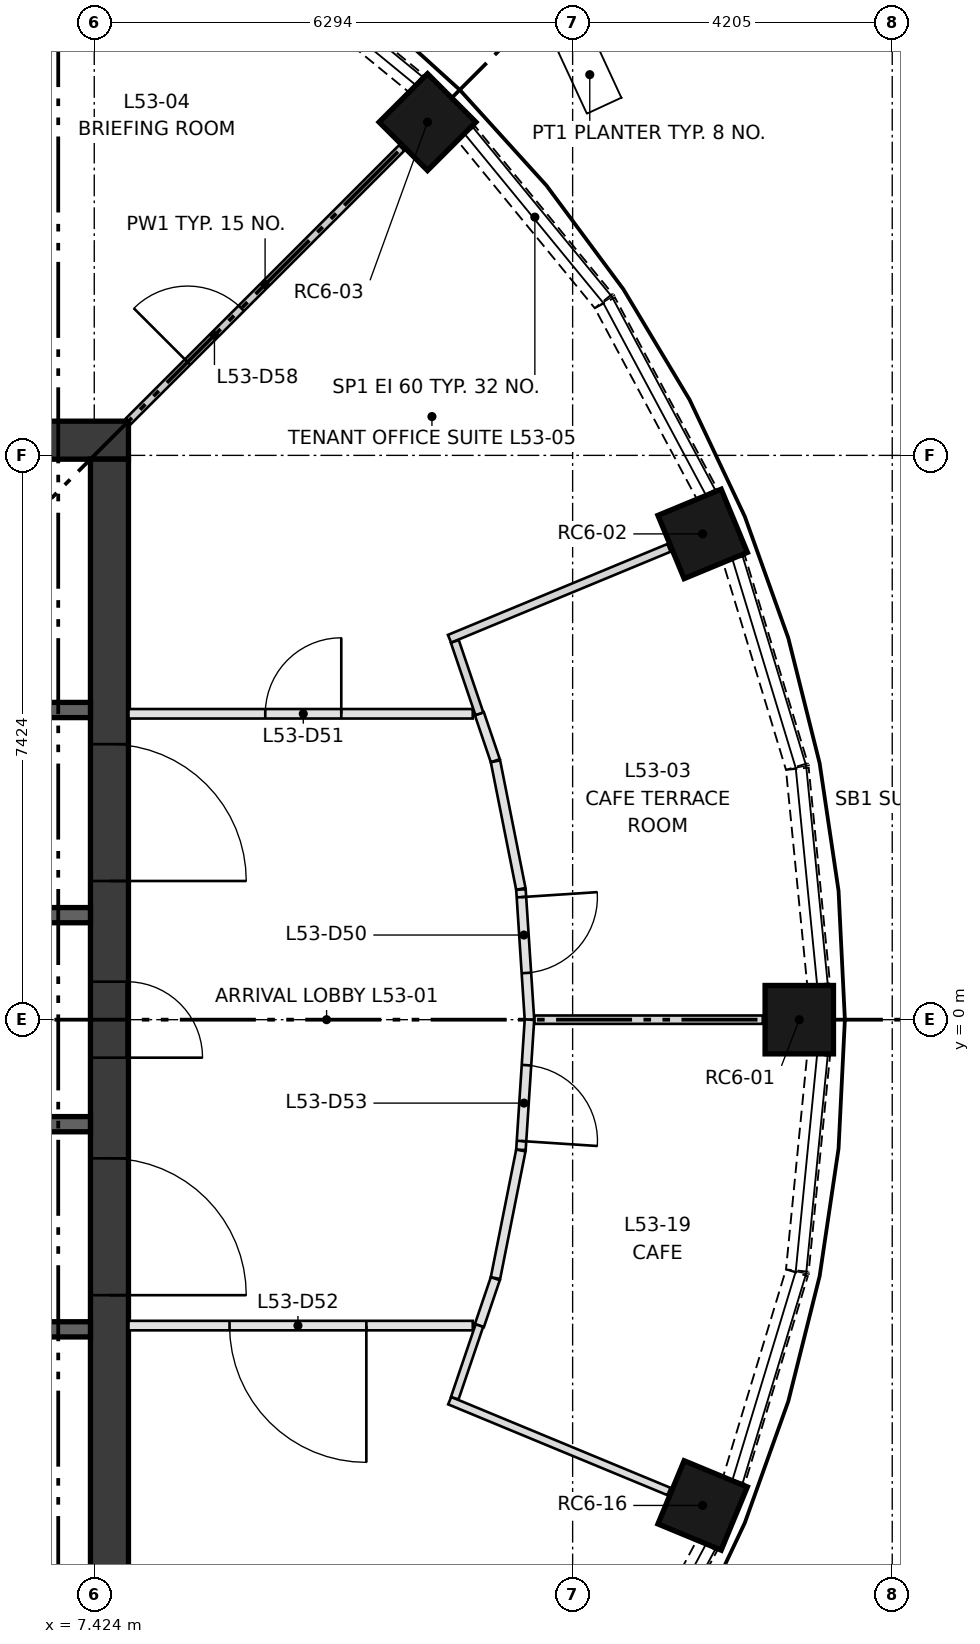
"""IFC4 building model, lengths in metres.
Left out: names, types, materials, properties, quantities, classifications, styles, units other than length and angle.
Written with IfcOpenShell. Run it as: python <this file> out.ifc"""

import sys

from ifc_helpers import new_model, si_unit, direction, frame, frame_2d, origin, origin_2d, place, context, subcontext, project, spatial, rectangle, extrude, element, fill, save


model = new_model("IFC4")
c1 = context("Model", 3, precision=1e-05, world=origin(), true_north=direction((0.0, 1.0)))
c2 = subcontext(c1, "Body", "Model", "MODEL_VIEW")
j1 = project(units=[si_unit("LENGTHUNIT", "METRE"), si_unit("PLANEANGLEUNIT", "RADIAN")], contexts=[c1])
p1 = place(None, origin())
s1 = spatial("IfcSite", under=j1, at=p1, CompositionType="ELEMENT")
p2 = place(p1, origin())
s2 = spatial("IfcBuilding", under=s1, at=p2, CompositionType="ELEMENT")
p3 = place(p2, frame((0.0, 0.0, 197.7)))
s3 = spatial("IfcBuildingStorey", under=s2, at=p3, CompositionType="ELEMENT", Elevation=197.7)
for number, where, z_axis, x_axis in (
    (1, (16.7, 0.0, 0.5), (0.0, 0.0, 1.0), (1.0, 0.0, 0.0)),
    (2, (15.429, 6.391, 0.5), (0.0, 0.0, 1.0), (0.924, 0.383, 0.0)),
    (3, (11.809, 11.809, 0.5), (0.0, 0.0, 1.0), (0.707, 0.707, 0.0)),
    (4, (15.429, -6.391, 0.5), (0.0, 0.0, 1.0), (0.924, -0.383, 0.0)),
):
    element("IfcColumn", number, at=place(p3, frame(where, z_axis=z_axis, x_axis=x_axis)), inside=s3, PredefinedType="COLUMN", context=c2, shape_type="SweptSolid", body=[
        extrude(rectangle(XDim=0.9, YDim=0.9, at=origin_2d()), origin(), (0.0, 0.0, 1.0), 2.85),
    ])
p4 = place(p3, frame((-7.874, 7.624, 0.0), z_axis=(0.0, 0.0, 1.0), x_axis=(1.0, 0.0, 0.0)))
e5 = element("IfcWall", 5, at=p4, inside=s3, PredefinedType="SHEAR", context=c2, shape_type="SweptSolid", body=[
    extrude(rectangle(XDim=15.748, YDim=0.5, at=frame_2d((7.874, 0.0))), origin(), (0.0, 0.0, 1.0), 3.35),
])
p5 = place(p3, frame((7.624, -7.374, 0.0), z_axis=(0.0, 0.0, 1.0), x_axis=(0.0, 1.0, 0.0)))
e6 = element("IfcWall", 6, at=p5, inside=s3, PredefinedType="SHEAR", context=c2, shape_type="SweptSolid", body=[
    extrude(rectangle(XDim=14.748, YDim=0.5, at=frame_2d((7.374, 0.0))), origin(), (0.0, 0.0, 1.0), 3.35),
])
p6 = place(p5, frame((6.874, 0.0, 0.0)))
e7 = element("IfcOpeningElement", 7, at=p6, cuts=e6, PredefinedType="OPENING", context=c2, shape_type="SweptSolid", body=[
    extrude(rectangle(XDim=1.0, YDim=2.1, at=frame_2d((0.5, 1.05))), frame((0.0, 0.26, 0.0), z_axis=(0.0, -1.0, 0.0), x_axis=(1.0, 0.0, 0.0)), (0.0, 0.0, 1.0), 0.52),
])
p7 = place(p5, frame((3.75, 0.0, 0.0)))
e8 = element("IfcOpeningElement", 8, at=p7, cuts=e6, PredefinedType="OPENING", context=c2, shape_type="SweptSolid", body=[
    extrude(rectangle(XDim=1.8, YDim=2.1, at=frame_2d((0.9, 1.05))), frame((0.0, 0.26, 0.0), z_axis=(0.0, -1.0, 0.0), x_axis=(1.0, 0.0, 0.0)), (0.0, 0.0, 1.0), 0.52),
])
p8 = place(p5, frame((9.198, 0.0, 0.0)))
e9 = element("IfcOpeningElement", 9, at=p8, cuts=e6, PredefinedType="OPENING", context=c2, shape_type="SweptSolid", body=[
    extrude(rectangle(XDim=1.8, YDim=2.1, at=frame_2d((0.9, 1.05))), frame((0.0, 0.26, 0.0), z_axis=(0.0, -1.0, 0.0), x_axis=(1.0, 0.0, 0.0)), (0.0, 0.0, 1.0), 0.52),
])
p9 = place(p3, frame((-7.374, -4.074, 0.0), z_axis=(0.0, 0.0, 1.0), x_axis=(1.0, 0.0, 0.0)))
e10 = element("IfcWall", 10, at=p9, inside=s3, PredefinedType="SHEAR", context=c2, shape_type="SweptSolid", body=[
    extrude(rectangle(XDim=14.748, YDim=0.2, at=frame_2d((7.374, 0.0))), origin(), (0.0, 0.0, 1.0), 3.0),
])
p10 = place(p9, frame((1.319, 0.0, 0.0)))
e11 = element("IfcOpeningElement", 11, at=p10, cuts=e10, PredefinedType="OPENING", context=c2, shape_type="SweptSolid", body=[
    extrude(rectangle(XDim=1.1, YDim=2.1, at=frame_2d((0.55, 1.05))), frame((0.0, 0.11, 0.0), z_axis=(0.0, -1.0, 0.0), x_axis=(1.0, 0.0, 0.0)), (0.0, 0.0, 1.0), 0.22),
])
p11 = place(p9, frame((4.456, 0.0, 0.0)))
e12 = element("IfcOpeningElement", 12, at=p11, cuts=e10, PredefinedType="OPENING", context=c2, shape_type="SweptSolid", body=[
    extrude(rectangle(XDim=1.1, YDim=2.1, at=frame_2d((0.55, 1.05))), frame((0.0, 0.11, 0.0), z_axis=(0.0, -1.0, 0.0), x_axis=(1.0, 0.0, 0.0)), (0.0, 0.0, 1.0), 0.22),
])
p12 = place(p9, frame((7.918, 0.0, 0.0)))
e13 = element("IfcOpeningElement", 13, at=p12, cuts=e10, PredefinedType="OPENING", context=c2, shape_type="SweptSolid", body=[
    extrude(rectangle(XDim=1.0, YDim=2.1, at=frame_2d((0.5, 1.05))), frame((0.0, 0.11, 0.0), z_axis=(0.0, -1.0, 0.0), x_axis=(1.0, 0.0, 0.0)), (0.0, 0.0, 1.0), 0.22),
])
p13 = place(p9, frame((10.51, 0.0, 0.0)))
e14 = element("IfcOpeningElement", 14, at=p13, cuts=e10, PredefinedType="OPENING", context=c2, shape_type="SweptSolid", body=[
    extrude(rectangle(XDim=1.0, YDim=2.1, at=frame_2d((0.5, 1.05))), frame((0.0, 0.11, 0.0), z_axis=(0.0, -1.0, 0.0), x_axis=(1.0, 0.0, 0.0)), (0.0, 0.0, 1.0), 0.22),
])
p14 = place(p9, frame((12.903, 0.0, 0.0)))
e15 = element("IfcOpeningElement", 15, at=p14, cuts=e10, PredefinedType="OPENING", context=c2, shape_type="SweptSolid", body=[
    extrude(rectangle(XDim=0.8, YDim=2.1, at=frame_2d((0.4, 1.05))), frame((0.0, 0.11, 0.0), z_axis=(0.0, -1.0, 0.0), x_axis=(1.0, 0.0, 0.0)), (0.0, 0.0, 1.0), 0.22),
])
p15 = place(p3, frame((0.0, 4.074, 0.0), z_axis=(0.0, 0.0, 1.0), x_axis=(1.0, 0.0, 0.0)))
e16 = element("IfcWall", 16, at=p15, inside=s3, PredefinedType="SHEAR", context=c2, shape_type="SweptSolid", body=[
    extrude(rectangle(XDim=7.374, YDim=0.2, at=frame_2d((3.687, 0.0))), origin(), (0.0, 0.0, 1.0), 3.0),
])
p16 = place(p15, frame((0.384, 0.0, 0.0)))
e17 = element("IfcOpeningElement", 17, at=p16, cuts=e16, PredefinedType="OPENING", context=c2, shape_type="SweptSolid", body=[
    extrude(rectangle(XDim=1.0, YDim=2.1, at=frame_2d((0.5, 1.05))), frame((0.0, 0.11, 0.0), z_axis=(0.0, -1.0, 0.0), x_axis=(1.0, 0.0, 0.0)), (0.0, 0.0, 1.0), 0.22),
])
p17 = place(p15, frame((2.153, 0.0, 0.0)))
e18 = element("IfcOpeningElement", 18, at=p17, cuts=e16, PredefinedType="OPENING", context=c2, shape_type="SweptSolid", body=[
    extrude(rectangle(XDim=1.0, YDim=2.1, at=frame_2d((0.5, 1.05))), frame((0.0, 0.11, 0.0), z_axis=(0.0, -1.0, 0.0), x_axis=(1.0, 0.0, 0.0)), (0.0, 0.0, 1.0), 0.22),
])
p18 = place(p15, frame((3.921, 0.0, 0.0)))
e19 = element("IfcOpeningElement", 19, at=p18, cuts=e16, PredefinedType="OPENING", context=c2, shape_type="SweptSolid", body=[
    extrude(rectangle(XDim=1.0, YDim=2.1, at=frame_2d((0.5, 1.05))), frame((0.0, 0.11, 0.0), z_axis=(0.0, -1.0, 0.0), x_axis=(1.0, 0.0, 0.0)), (0.0, 0.0, 1.0), 0.22),
])
p19 = place(p15, frame((5.79, 0.0, 0.0)))
e20 = element("IfcOpeningElement", 20, at=p19, cuts=e16, PredefinedType="OPENING", context=c2, shape_type="SweptSolid", body=[
    extrude(rectangle(XDim=0.8, YDim=2.1, at=frame_2d((0.4, 1.05))), frame((0.0, 0.11, 0.0), z_axis=(0.0, -1.0, 0.0), x_axis=(1.0, 0.0, 0.0)), (0.0, 0.0, 1.0), 0.22),
])
for number, where, z_axis, x_axis in (
    (21, (4.374, -1.375, 0.0), (0.0, 0.0, 1.0), (1.0, 0.0, 0.0)),
    (22, (4.374, 1.375, 0.0), (0.0, 0.0, 1.0), (1.0, 0.0, 0.0)),
):
    element("IfcWall", number, at=place(p3, frame(where, z_axis=z_axis, x_axis=x_axis)), inside=s3, PredefinedType="SHEAR", context=c2, shape_type="SweptSolid", body=[
        extrude(rectangle(XDim=3.0, YDim=0.2, at=frame_2d((1.5, 0.0))), origin(), (0.0, 0.0, 1.0), 3.0),
    ])
p20 = place(p3, frame((16.955, 0.464, 0.0), z_axis=(0.0, 0.0, 1.0), x_axis=(-0.098223350935, 0.995164395128, 0.0)))
e23 = element("IfcWall", 23, at=p20, inside=s3, PredefinedType="SOLIDWALL", context=c2, shape_type="SweptSolid", body=[
    extrude(rectangle(XDim=2.851, YDim=0.3, at=frame_2d((1.425, 0.0))), origin(), (0.0, 0.0, 1.0), 0.9),
])
p21 = place(p3, frame((16.669, 3.33, 0.0), z_axis=(0.0, 0.0, 1.0), x_axis=(-0.290432618929, 0.956895445627, 0.0)))
e24 = element("IfcWall", 24, at=p21, inside=s3, PredefinedType="SOLIDWALL", context=c2, shape_type="SweptSolid", body=[
    extrude(rectangle(XDim=2.852, YDim=0.3, at=frame_2d((1.426, 0.0))), origin(), (0.0, 0.0, 1.0), 0.9),
])
p22 = place(p3, frame((15.486, 6.917, 0.0), z_axis=(0.0, 0.0, 1.0), x_axis=(-0.471441594872, 0.881897285756, 0.0)))
e25 = element("IfcWall", 25, at=p22, inside=s3, PredefinedType="SOLIDWALL", context=c2, shape_type="SweptSolid", body=[
    extrude(rectangle(XDim=2.85, YDim=0.3, at=frame_2d((1.425, 0.0))), origin(), (0.0, 0.0, 1.0), 0.9),
])
for number, where, z_axis, x_axis in (
    (26, (14.125, 9.456, 0.0), (0.0, 0.0, 1.0), (-0.634, 0.773, 0.0)),
    (27, (11.661, 12.316, 0.0), (0.0, 0.0, 1.0), (-0.773, 0.634, 0.0)),
):
    element("IfcWall", number, at=place(p3, frame(where, z_axis=z_axis, x_axis=x_axis)), inside=s3, PredefinedType="SOLIDWALL", context=c2, shape_type="SweptSolid", body=[
        extrude(rectangle(XDim=2.853, YDim=0.3, at=frame_2d((1.426, 0.0))), origin(), (0.0, 0.0, 1.0), 0.9),
    ])
p23 = place(p3, frame((14.142, -9.431, 0.0), z_axis=(0.0, 0.0, 1.0), x_axis=(0.471441594872, 0.881897285756, 0.0)))
e28 = element("IfcWall", 28, at=p23, inside=s3, PredefinedType="SOLIDWALL", context=c2, shape_type="SweptSolid", body=[
    extrude(rectangle(XDim=2.85, YDim=0.3, at=frame_2d((1.425, 0.0))), origin(), (0.0, 0.0, 1.0), 0.9),
])
p24 = place(p3, frame((15.84, -6.06, 0.0), z_axis=(0.0, 0.0, 1.0), x_axis=(0.290432618929, 0.956895445627, 0.0)))
e29 = element("IfcWall", 29, at=p24, inside=s3, PredefinedType="SOLIDWALL", context=c2, shape_type="SweptSolid", body=[
    extrude(rectangle(XDim=2.852, YDim=0.3, at=frame_2d((1.426, 0.0))), origin(), (0.0, 0.0, 1.0), 0.9),
])
p25 = place(p3, frame((16.675, -3.301, 0.0), z_axis=(0.0, 0.0, 1.0), x_axis=(0.098223350935, 0.995164395128, 0.0)))
e30 = element("IfcWall", 30, at=p25, inside=s3, PredefinedType="SOLIDWALL", context=c2, shape_type="SweptSolid", body=[
    extrude(rectangle(XDim=2.851, YDim=0.3, at=frame_2d((1.425, 0.0))), origin(), (0.0, 0.0, 1.0), 0.9),
])
p26 = place(p3, frame((12.491, 4.024, 0.0), z_axis=(0.0, 0.0, 1.0), x_axis=(0.321506357846, -0.946907419902, 0.0)))
e31 = element("IfcWall", 31, at=p26, inside=s3, PredefinedType="PARTITIONING", context=c2, shape_type="SweptSolid", body=[
    extrude(rectangle(XDim=0.652, YDim=0.125, at=frame_2d((0.326, 0.0))), origin(), (0.0, 0.0, 1.0), 3.0),
])
p27 = place(p3, frame((12.703, 3.399, 0.0), z_axis=(0.0, 0.0, 1.0), x_axis=(0.195101249107, -0.980783106806, 0.0)))
e32 = element("IfcWall", 32, at=p27, inside=s3, PredefinedType="PARTITIONING", context=c2, shape_type="SweptSolid", body=[
    extrude(rectangle(XDim=1.712, YDim=0.125, at=frame_2d((0.856, 0.0))), origin(), (0.0, 0.0, 1.0), 3.0),
])
p28 = place(p3, frame((13.038, 1.712, 0.0), z_axis=(0.0, 0.0, 1.0), x_axis=(0.065300872496, -0.997865620237, 0.0)))
e33 = element("IfcWall", 33, at=p28, inside=s3, PredefinedType="PARTITIONING", context=c2, shape_type="SweptSolid", body=[
    extrude(rectangle(XDim=1.716, YDim=0.125, at=frame_2d((0.858, 0.0))), origin(), (0.0, 0.0, 1.0), 3.0),
])
p29 = place(p28, frame((0.1, 0.0, 0.0)))
e34 = element("IfcOpeningElement", 34, at=p29, cuts=e33, PredefinedType="OPENING", context=c2, shape_type="SweptSolid", body=[
    extrude(rectangle(XDim=1.0, YDim=2.1, at=frame_2d((0.5, 1.05))), frame((0.0, 0.073, 0.0), z_axis=(0.0, -1.0, 0.0), x_axis=(1.0, 0.0, 0.0)), (0.0, 0.0, 1.0), 0.145),
])
p30 = place(p3, frame((7.874, 4.024, 0.0), z_axis=(0.0, 0.0, 1.0), x_axis=(1.0, 0.0, 0.0)))
e35 = element("IfcWall", 35, at=p30, inside=s3, PredefinedType="PARTITIONING", context=c2, shape_type="SweptSolid", body=[
    extrude(rectangle(XDim=4.53, YDim=0.125, at=frame_2d((2.265, 0.0))), origin(), (0.0, 0.0, 1.0), 3.0),
])
p31 = place(p30, frame((1.8, 0.0, 0.0)))
e36 = element("IfcOpeningElement", 36, at=p31, cuts=e35, PredefinedType="OPENING", context=c2, shape_type="SweptSolid", body=[
    extrude(rectangle(XDim=1.0, YDim=2.1, at=frame_2d((0.5, 1.05))), frame((0.0, 0.073, 0.0), z_axis=(0.0, -1.0, 0.0), x_axis=(1.0, 0.0, 0.0)), (0.0, 0.0, 1.0), 0.145),
])
p32 = place(p3, frame((12.404, -4.024, 0.0), z_axis=(0.0, 0.0, 1.0), x_axis=(-1.0, 0.0, 0.0)))
e37 = element("IfcWall", 37, at=p32, inside=s3, PredefinedType="PARTITIONING", context=c2, shape_type="SweptSolid", body=[
    extrude(rectangle(XDim=4.53, YDim=0.125, at=frame_2d((2.265, 0.0))), origin(), (0.0, 0.0, 1.0), 3.0),
])
p33 = place(p32, frame((1.4, 0.0, 0.0)))
e38 = element("IfcOpeningElement", 38, at=p33, cuts=e37, PredefinedType="OPENING", context=c2, shape_type="SweptSolid", body=[
    extrude(rectangle(XDim=1.8, YDim=2.1, at=frame_2d((0.9, 1.05))), frame((0.0, 0.073, 0.0), z_axis=(0.0, -1.0, 0.0), x_axis=(1.0, 0.0, 0.0)), (0.0, 0.0, 1.0), 0.145),
])
p34 = place(p3, frame((12.701, -3.407, 0.0), z_axis=(0.0, 0.0, 1.0), x_axis=(-0.321506357846, -0.946907419902, 0.0)))
e39 = element("IfcWall", 39, at=p34, inside=s3, PredefinedType="PARTITIONING", context=c2, shape_type="SweptSolid", body=[
    extrude(rectangle(XDim=0.652, YDim=0.125, at=frame_2d((0.326, 0.0))), origin(), (0.0, 0.0, 1.0), 3.0),
])
p35 = place(p3, frame((13.037, -1.72, 0.0), z_axis=(0.0, 0.0, 1.0), x_axis=(-0.195101249107, -0.980783106806, 0.0)))
e40 = element("IfcWall", 40, at=p35, inside=s3, PredefinedType="PARTITIONING", context=c2, shape_type="SweptSolid", body=[
    extrude(rectangle(XDim=1.712, YDim=0.125, at=frame_2d((0.856, 0.0))), origin(), (0.0, 0.0, 1.0), 3.0),
])
p36 = place(p3, frame((13.15, 0.0, 0.0), z_axis=(0.0, 0.0, 1.0), x_axis=(-0.065300872496, -0.997865620237, 0.0)))
e41 = element("IfcWall", 41, at=p36, inside=s3, PredefinedType="PARTITIONING", context=c2, shape_type="SweptSolid", body=[
    extrude(rectangle(XDim=1.716, YDim=0.125, at=frame_2d((0.858, 0.0))), origin(), (0.0, 0.0, 1.0), 3.0),
])
p37 = place(p36, frame((0.6, 0.0, 0.0)))
e42 = element("IfcOpeningElement", 42, at=p37, cuts=e41, PredefinedType="OPENING", context=c2, shape_type="SweptSolid", body=[
    extrude(rectangle(XDim=1.0, YDim=2.1, at=frame_2d((0.5, 1.05))), frame((0.0, 0.073, 0.0), z_axis=(0.0, -1.0, 0.0), x_axis=(1.0, 0.0, 0.0)), (0.0, 0.0, 1.0), 0.145),
])
p38 = place(p3, frame((12.098, 5.011, 0.0), z_axis=(0.0, 0.0, 1.0), x_axis=(0.923893054844, 0.382650784934, 0.0)))
e43 = element("IfcWall", 43, at=p38, inside=s3, PredefinedType="PARTITIONING", context=c2, shape_type="SweptSolid", body=[
    extrude(rectangle(XDim=3.125, YDim=0.11, at=frame_2d((1.562, 0.0))), origin(), (0.0, 0.0, 1.0), 3.0),
])
p39 = place(p3, frame((12.491, 4.024, 0.0), z_axis=(0.0, 0.0, 1.0), x_axis=(-0.321393524097, 0.94694572319, 0.0)))
e44 = element("IfcWall", 44, at=p39, inside=s3, PredefinedType="PARTITIONING", context=c2, shape_type="SweptSolid", body=[
    extrude(rectangle(XDim=1.006, YDim=0.11, at=frame_2d((0.503, 0.0))), origin(), (0.0, 0.0, 1.0), 3.0),
])
p40 = place(p3, frame((16.22, 0.0, 0.0), z_axis=(0.0, 0.0, 1.0), x_axis=(-1.0, 0.0, 0.0)))
e45 = element("IfcWall", 45, at=p40, inside=s3, PredefinedType="PARTITIONING", context=c2, shape_type="SweptSolid", body=[
    extrude(rectangle(XDim=3.004, YDim=0.11, at=frame_2d((1.502, 0.0))), origin(), (0.0, 0.0, 1.0), 3.0),
])
p41 = place(p3, frame((7.874, 7.874, 0.0), z_axis=(0.0, 0.0, 1.0), x_axis=(0.707106781187, 0.707106781187, 0.0)))
e46 = element("IfcWall", 46, at=p41, inside=s3, PredefinedType="PARTITIONING", context=c2, shape_type="SweptSolid", body=[
    extrude(rectangle(XDim=5.084, YDim=0.1, at=frame_2d((2.542, 0.0))), origin(), (0.0, 0.0, 1.0), 3.0),
])
p42 = place(p41, frame((1.1, 0.0, 0.0)))
e47 = element("IfcOpeningElement", 47, at=p42, cuts=e46, PredefinedType="OPENING", context=c2, shape_type="SweptSolid", body=[
    extrude(rectangle(XDim=1.0, YDim=2.1, at=frame_2d((0.5, 1.05))), frame((0.0, 0.06, 0.0), z_axis=(0.0, -1.0, 0.0), x_axis=(1.0, 0.0, 0.0)), (0.0, 0.0, 1.0), 0.12),
])
p43 = place(p3, frame((12.101, -5.012, 0.0), z_axis=(0.0, 0.0, 1.0), x_axis=(0.923889137288, -0.382660243559, 0.0)))
e48 = element("IfcWall", 48, at=p43, inside=s3, PredefinedType="PARTITIONING", context=c2, shape_type="SweptSolid", body=[
    extrude(rectangle(XDim=3.122, YDim=0.105, at=frame_2d((1.561, 0.0))), origin(), (0.0, 0.0, 1.0), 3.0),
])
p44 = place(p3, frame((12.491, -4.024, 0.0), z_axis=(0.0, 0.0, 1.0), x_axis=(-0.321525085424, -0.946901061064, 0.0)))
e49 = element("IfcWall", 49, at=p44, inside=s3, PredefinedType="PARTITIONING", context=c2, shape_type="SweptSolid", body=[
    extrude(rectangle(XDim=1.008, YDim=0.105, at=frame_2d((0.504, 0.0))), origin(), (0.0, 0.0, 1.0), 3.0),
])
p45 = place(p6, frame((1.0, 0.0, 0.0), z_axis=(0.0, 0.0, 1.0), x_axis=(-1.0, 0.0, 0.0)))
e50 = element("IfcDoor", 50, at=p45, inside=s3, OperationType="SINGLE_SWING_LEFT", PredefinedType="DOOR", context=c2, shape_type="SweptSolid", body=[
    extrude(rectangle(XDim=1.0, YDim=2.1, at=frame_2d((0.5, 1.05))), frame((0.0, 0.25, 0.0), z_axis=(0.0, -1.0, 0.0), x_axis=(1.0, 0.0, 0.0)), (0.0, 0.0, 1.0), 0.05),
])
fill(e7, e50)
p46 = place(p7, frame((1.8, 0.0, 0.0), z_axis=(0.0, 0.0, 1.0), x_axis=(-1.0, 0.0, 0.0)))
e51 = element("IfcDoor", 51, at=p46, inside=s3, OperationType="DOUBLE_DOOR_SINGLE_SWING", PredefinedType="DOOR", context=c2, shape_type="SweptSolid", body=[
    extrude(rectangle(XDim=1.8, YDim=2.1, at=frame_2d((0.9, 1.05))), frame((0.0, 0.025, 0.0), z_axis=(0.0, -1.0, 0.0), x_axis=(1.0, 0.0, 0.0)), (0.0, 0.0, 1.0), 0.05),
])
fill(e8, e51)
p47 = place(p8, frame((1.8, 0.0, 0.0), z_axis=(0.0, 0.0, 1.0), x_axis=(-1.0, 0.0, 0.0)))
e52 = element("IfcDoor", 52, at=p47, inside=s3, OperationType="DOUBLE_DOOR_SINGLE_SWING", PredefinedType="DOOR", context=c2, shape_type="SweptSolid", body=[
    extrude(rectangle(XDim=1.8, YDim=2.1, at=frame_2d((0.9, 1.05))), frame((0.0, 0.025, 0.0), z_axis=(0.0, -1.0, 0.0), x_axis=(1.0, 0.0, 0.0)), (0.0, 0.0, 1.0), 0.05),
])
fill(e9, e52)
p48 = place(p29, origin())
e53 = element("IfcDoor", 53, at=p48, inside=s3, OperationType="SINGLE_SWING_LEFT", PredefinedType="DOOR", context=c2, shape_type="SweptSolid", body=[
    extrude(rectangle(XDim=1.0, YDim=2.1, at=frame_2d((0.5, 1.05))), frame((0.0, 0.025, 0.0), z_axis=(0.0, -1.0, 0.0), x_axis=(1.0, 0.0, 0.0)), (0.0, 0.0, 1.0), 0.05),
])
fill(e34, e53)
p49 = place(p31, origin())
e54 = element("IfcDoor", 54, at=p49, inside=s3, OperationType="SINGLE_SWING_RIGHT", PredefinedType="DOOR", context=c2, shape_type="SweptSolid", body=[
    extrude(rectangle(XDim=1.0, YDim=2.1, at=frame_2d((0.5, 1.05))), frame((0.0, 0.025, 0.0), z_axis=(0.0, -1.0, 0.0), x_axis=(1.0, 0.0, 0.0)), (0.0, 0.0, 1.0), 0.05),
])
fill(e36, e54)
p50 = place(p33, origin())
e55 = element("IfcDoor", 55, at=p50, inside=s3, OperationType="DOUBLE_DOOR_SINGLE_SWING", PredefinedType="DOOR", context=c2, shape_type="SweptSolid", body=[
    extrude(rectangle(XDim=1.8, YDim=2.1, at=frame_2d((0.9, 1.05))), frame((0.0, 0.025, 0.0), z_axis=(0.0, -1.0, 0.0), x_axis=(1.0, 0.0, 0.0)), (0.0, 0.0, 1.0), 0.05),
])
fill(e38, e55)
p51 = place(p37, origin())
e56 = element("IfcDoor", 56, at=p51, inside=s3, OperationType="SINGLE_SWING_RIGHT", PredefinedType="DOOR", context=c2, shape_type="SweptSolid", body=[
    extrude(rectangle(XDim=1.0, YDim=2.1, at=frame_2d((0.5, 1.05))), frame((0.0, 0.025, 0.0), z_axis=(0.0, -1.0, 0.0), x_axis=(1.0, 0.0, 0.0)), (0.0, 0.0, 1.0), 0.05),
])
fill(e42, e56)
p52 = place(p42, origin())
e57 = element("IfcDoor", 57, at=p52, inside=s3, OperationType="SINGLE_SWING_LEFT", PredefinedType="DOOR", context=c2, shape_type="SweptSolid", body=[
    extrude(rectangle(XDim=1.0, YDim=2.1, at=frame_2d((0.5, 1.05))), frame((0.0, 0.025, 0.0), z_axis=(0.0, -1.0, 0.0), x_axis=(1.0, 0.0, 0.0)), (0.0, 0.0, 1.0), 0.05),
])
fill(e47, e57)
save(model, sys.argv[1])
